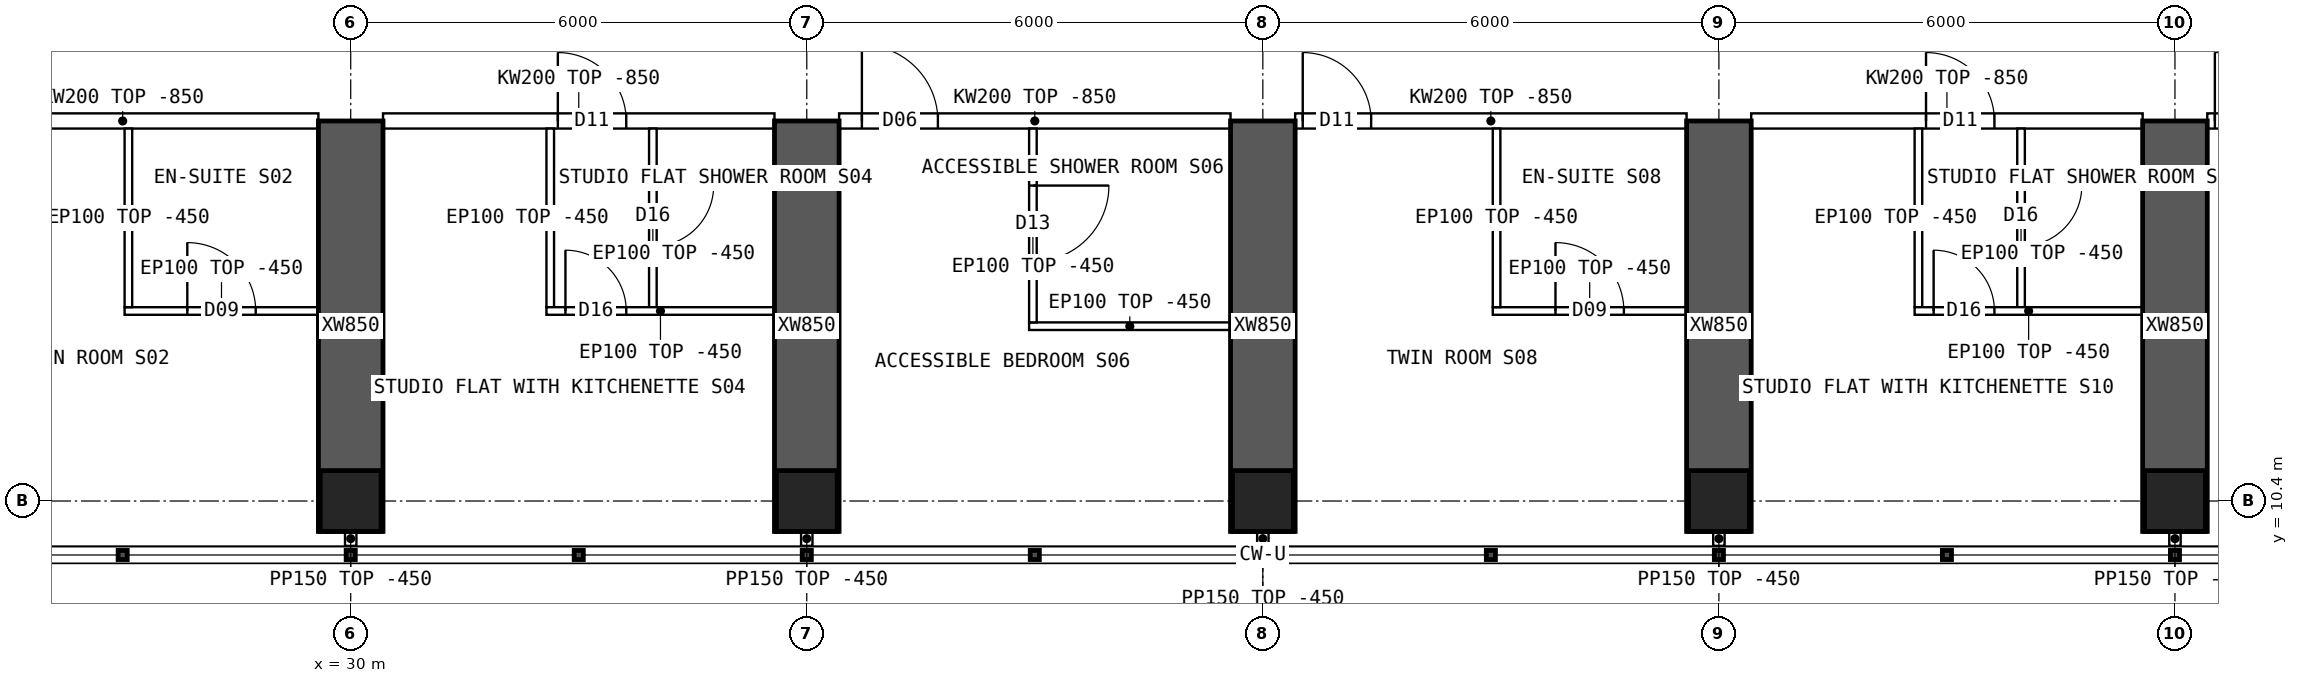
"""IFC4 building model, lengths in metres.
Left out: names, types, materials, properties, quantities, classifications, styles, units other than length and angle.
Written with IfcOpenShell. Run it as: python <this file> out.ifc"""

import sys

from ifc_helpers import new_model, si_unit, direction, frame, frame_2d, origin, origin_2d, place, context, subcontext, project, spatial, polyline, rectangle, hollow_rectangle, outline, extrude, element, fill, save


model = new_model("IFC4")
c1 = context("Model", 3, precision=1e-05, world=origin(), true_north=direction((0.0, 1.0)))
c2 = subcontext(c1, "Body", "Model", "MODEL_VIEW")
j1 = project(units=[si_unit("LENGTHUNIT", "METRE"), si_unit("PLANEANGLEUNIT", "RADIAN")], contexts=[c1])
p1 = place(None, origin())
s1 = spatial("IfcSite", under=j1, at=p1, CompositionType="ELEMENT")
p2 = place(p1, origin())
s2 = spatial("IfcBuilding", under=s1, at=p2, CompositionType="ELEMENT")
p3 = place(p2, frame((0.0, 0.0, 144.85)))
s3 = spatial("IfcBuildingStorey", under=s2, at=p3, CompositionType="ELEMENT", Elevation=144.85)
for number, where, z_axis, x_axis in (
    (1, (30.0, 10.4, 0.0), (0.0, 0.0, 1.0), (1.0, 0.0, 0.0)),
    (2, (36.0, 10.4, 0.0), (0.0, 0.0, 1.0), (1.0, 0.0, 0.0)),
    (3, (42.0, 10.4, 0.0), (0.0, 0.0, 1.0), (1.0, 0.0, 0.0)),
    (4, (48.0, 10.4, 0.0), (0.0, 0.0, 1.0), (1.0, 0.0, 0.0)),
    (5, (54.0, 10.4, 0.0), (0.0, 0.0, 1.0), (1.0, 0.0, 0.0)),
):
    element("IfcColumn", number, at=place(p3, frame(where, z_axis=z_axis, x_axis=x_axis)), inside=s3, PredefinedType="COLUMN", context=c2, shape_type="SweptSolid", body=[
        extrude(hollow_rectangle(XDim=0.8, YDim=0.8, WallThickness=0.08, at=origin_2d()), origin(), (0.0, 0.0, 1.0), 3.75),
    ])
for number, where, z_axis, x_axis in (
    (6, (30.0, 10.0, 0.0), (0.0, 0.0, 1.0), (0.0, 1.0, 0.0)),
    (7, (36.0, 10.0, 0.0), (0.0, 0.0, 1.0), (0.0, 1.0, 0.0)),
    (8, (42.0, 10.0, 0.0), (0.0, 0.0, 1.0), (0.0, 1.0, 0.0)),
    (9, (48.0, 10.0, 0.0), (0.0, 0.0, 1.0), (0.0, 1.0, 0.0)),
    (10, (54.0, 10.0, 0.0), (0.0, 0.0, 1.0), (0.0, 1.0, 0.0)),
):
    element("IfcWall", number, at=place(p3, frame(where, z_axis=z_axis, x_axis=x_axis)), inside=s3, PredefinedType="SHEAR", context=c2, shape_type="SweptSolid", body=[
        extrude(rectangle(XDim=5.4, YDim=0.85, at=frame_2d((2.7, 0.0))), origin(), (0.0, 0.0, 1.0), 3.75),
    ])
p4 = place(p3, frame((24.425, 15.4, 0.0), z_axis=(0.0, 0.0, 1.0), x_axis=(1.0, 0.0, 0.0)))
e11 = element("IfcWall", 11, at=p4, inside=s3, PredefinedType="SOLIDWALL", context=c2, shape_type="SweptSolid", body=[
    extrude(outline(polyline([(0.0, 0.0), (5.15, 0.0), (5.15, 2.9), (0.0, 2.9), (0.0, 0.0)])), frame((0.0, 0.1, 0.0), z_axis=(0.0, -1.0, 0.0), x_axis=(1.0, 0.0, 0.0)), (0.0, 0.0, 1.0), 0.2),
])
p5 = place(p4, frame((0.1, 0.0, 0.0)))
e12 = element("IfcOpeningElement", 12, at=p5, cuts=e11, PredefinedType="OPENING", context=c2, shape_type="SweptSolid", body=[
    extrude(rectangle(XDim=0.9, YDim=2.1, at=frame_2d((0.45, 1.05))), frame((0.0, 0.11, 0.0), z_axis=(0.0, -1.0, 0.0), x_axis=(1.0, 0.0, 0.0)), (0.0, 0.0, 1.0), 0.22),
])
p6 = place(p3, frame((30.425, 15.4, 0.0), z_axis=(0.0, 0.0, 1.0), x_axis=(1.0, 0.0, 0.0)))
e13 = element("IfcWall", 13, at=p6, inside=s3, PredefinedType="SOLIDWALL", context=c2, shape_type="SweptSolid", body=[
    extrude(outline(polyline([(0.0, 0.0), (5.15, 0.0), (5.15, 2.9), (0.0, 2.9), (0.0, 0.0)])), frame((0.0, 0.1, 0.0), z_axis=(0.0, -1.0, 0.0), x_axis=(1.0, 0.0, 0.0)), (0.0, 0.0, 1.0), 0.2),
])
p7 = place(p6, frame((2.3, 0.0, 0.0)))
e14 = element("IfcOpeningElement", 14, at=p7, cuts=e13, PredefinedType="OPENING", context=c2, shape_type="SweptSolid", body=[
    extrude(rectangle(XDim=0.9, YDim=2.1, at=frame_2d((0.45, 1.05))), frame((0.0, 0.11, 0.0), z_axis=(0.0, -1.0, 0.0), x_axis=(1.0, 0.0, 0.0)), (0.0, 0.0, 1.0), 0.22),
])
p8 = place(p3, frame((36.425, 15.4, 0.0), z_axis=(0.0, 0.0, 1.0), x_axis=(1.0, 0.0, 0.0)))
e15 = element("IfcWall", 15, at=p8, inside=s3, PredefinedType="SOLIDWALL", context=c2, shape_type="SweptSolid", body=[
    extrude(outline(polyline([(0.0, 0.0), (5.15, 0.0), (5.15, 2.9), (0.0, 2.9), (0.0, 0.0)])), frame((0.0, 0.1, 0.0), z_axis=(0.0, -1.0, 0.0), x_axis=(1.0, 0.0, 0.0)), (0.0, 0.0, 1.0), 0.2),
])
p9 = place(p8, frame((0.3, 0.0, 0.0)))
e16 = element("IfcOpeningElement", 16, at=p9, cuts=e15, PredefinedType="OPENING", context=c2, shape_type="SweptSolid", body=[
    extrude(rectangle(XDim=1.0, YDim=2.1, at=frame_2d((0.5, 1.05))), frame((0.0, 0.11, 0.0), z_axis=(0.0, -1.0, 0.0), x_axis=(1.0, 0.0, 0.0)), (0.0, 0.0, 1.0), 0.22),
])
p10 = place(p3, frame((42.425, 15.4, 0.0), z_axis=(0.0, 0.0, 1.0), x_axis=(1.0, 0.0, 0.0)))
e17 = element("IfcWall", 17, at=p10, inside=s3, PredefinedType="SOLIDWALL", context=c2, shape_type="SweptSolid", body=[
    extrude(outline(polyline([(0.0, 0.0), (5.15, 0.0), (5.15, 2.9), (0.0, 2.9), (0.0, 0.0)])), frame((0.0, 0.1, 0.0), z_axis=(0.0, -1.0, 0.0), x_axis=(1.0, 0.0, 0.0)), (0.0, 0.0, 1.0), 0.2),
])
p11 = place(p10, frame((0.1, 0.0, 0.0)))
e18 = element("IfcOpeningElement", 18, at=p11, cuts=e17, PredefinedType="OPENING", context=c2, shape_type="SweptSolid", body=[
    extrude(rectangle(XDim=0.9, YDim=2.1, at=frame_2d((0.45, 1.05))), frame((0.0, 0.11, 0.0), z_axis=(0.0, -1.0, 0.0), x_axis=(1.0, 0.0, 0.0)), (0.0, 0.0, 1.0), 0.22),
])
p12 = place(p3, frame((48.425, 15.4, 0.0), z_axis=(0.0, 0.0, 1.0), x_axis=(1.0, 0.0, 0.0)))
e19 = element("IfcWall", 19, at=p12, inside=s3, PredefinedType="SOLIDWALL", context=c2, shape_type="SweptSolid", body=[
    extrude(outline(polyline([(0.0, 0.0), (5.15, 0.0), (5.15, 2.9), (0.0, 2.9), (0.0, 0.0)])), frame((0.0, 0.1, 0.0), z_axis=(0.0, -1.0, 0.0), x_axis=(1.0, 0.0, 0.0)), (0.0, 0.0, 1.0), 0.2),
])
p13 = place(p12, frame((2.3, 0.0, 0.0)))
e20 = element("IfcOpeningElement", 20, at=p13, cuts=e19, PredefinedType="OPENING", context=c2, shape_type="SweptSolid", body=[
    extrude(rectangle(XDim=0.9, YDim=2.1, at=frame_2d((0.45, 1.05))), frame((0.0, 0.11, 0.0), z_axis=(0.0, -1.0, 0.0), x_axis=(1.0, 0.0, 0.0)), (0.0, 0.0, 1.0), 0.22),
])
p14 = place(p3, frame((54.425, 15.4, 0.0), z_axis=(0.0, 0.0, 1.0), x_axis=(1.0, 0.0, 0.0)))
e21 = element("IfcWall", 21, at=p14, inside=s3, PredefinedType="SOLIDWALL", context=c2, shape_type="SweptSolid", body=[
    extrude(outline(polyline([(0.0, 0.0), (5.15, 0.0), (5.15, 2.9), (0.0, 2.9), (0.0, 0.0)])), frame((0.0, 0.1, 0.0), z_axis=(0.0, -1.0, 0.0), x_axis=(1.0, 0.0, 0.0)), (0.0, 0.0, 1.0), 0.2),
])
p15 = place(p14, frame((0.1, 0.0, 0.0)))
e22 = element("IfcOpeningElement", 22, at=p15, cuts=e21, PredefinedType="OPENING", context=c2, shape_type="SweptSolid", body=[
    extrude(rectangle(XDim=0.9, YDim=2.1, at=frame_2d((0.45, 1.05))), frame((0.0, 0.11, 0.0), z_axis=(0.0, -1.0, 0.0), x_axis=(1.0, 0.0, 0.0)), (0.0, 0.0, 1.0), 0.22),
])
p16 = place(p3, frame((29.575, 12.9, 0.0), z_axis=(0.0, 0.0, 1.0), x_axis=(-1.0, 0.0, 0.0)))
e23 = element("IfcWall", 23, at=p16, inside=s3, PredefinedType="PARTITIONING", context=c2, shape_type="SweptSolid", body=[
    extrude(rectangle(XDim=2.55, YDim=0.1, at=frame_2d((1.275, 0.0))), origin(), (0.0, 0.0, 1.0), 3.3),
])
p17 = place(p16, frame((0.825, 0.0, 0.0)))
e24 = element("IfcOpeningElement", 24, at=p17, cuts=e23, PredefinedType="OPENING", context=c2, shape_type="SweptSolid", body=[
    extrude(rectangle(XDim=0.9, YDim=2.1, at=frame_2d((0.45, 1.05))), frame((0.0, 0.06, 0.0), z_axis=(0.0, -1.0, 0.0), x_axis=(1.0, 0.0, 0.0)), (0.0, 0.0, 1.0), 0.12),
])
p18 = place(p3, frame((27.075, 12.95, 0.0), z_axis=(0.0, 0.0, 1.0), x_axis=(0.0, 1.0, 0.0)))
e25 = element("IfcWall", 25, at=p18, inside=s3, PredefinedType="PARTITIONING", context=c2, shape_type="SweptSolid", body=[
    extrude(outline(polyline([(0.0, 0.0), (2.35, 0.0), (2.35, 2.9), (2.302, 2.9), (2.3, 3.3), (0.0, 3.3), (0.0, 0.0)])), frame((0.0, 0.05, 0.0), z_axis=(0.0, -1.0, 0.0), x_axis=(1.0, 0.0, 0.0)), (0.0, 0.0, 1.0), 0.1),
])
p19 = place(p3, frame((35.575, 12.9, 0.0), z_axis=(0.0, 0.0, 1.0), x_axis=(-1.0, 0.0, 0.0)))
e26 = element("IfcWall", 26, at=p19, inside=s3, PredefinedType="PARTITIONING", context=c2, shape_type="SweptSolid", body=[
    extrude(rectangle(XDim=3.0, YDim=0.1, at=frame_2d((1.5, 0.0))), origin(), (0.0, 0.0, 1.0), 3.3),
])
p20 = place(p19, frame((1.95, 0.0, 0.0)))
e27 = element("IfcOpeningElement", 27, at=p20, cuts=e26, PredefinedType="OPENING", context=c2, shape_type="SweptSolid", body=[
    extrude(rectangle(XDim=0.8, YDim=2.1, at=frame_2d((0.4, 1.05))), frame((0.0, 0.06, 0.0), z_axis=(0.0, -1.0, 0.0), x_axis=(1.0, 0.0, 0.0)), (0.0, 0.0, 1.0), 0.12),
])
p21 = place(p3, frame((32.625, 12.95, 0.0), z_axis=(0.0, 0.0, 1.0), x_axis=(0.0, 1.0, 0.0)))
e28 = element("IfcWall", 28, at=p21, inside=s3, PredefinedType="PARTITIONING", context=c2, shape_type="SweptSolid", body=[
    extrude(outline(polyline([(0.0, 0.0), (2.35, 0.0), (2.35, 2.9), (2.302, 2.9), (2.3, 3.3), (0.0, 3.3), (0.0, 0.0)])), frame((0.0, 0.05, 0.0), z_axis=(0.0, -1.0, 0.0), x_axis=(1.0, 0.0, 0.0)), (0.0, 0.0, 1.0), 0.1),
])
p22 = place(p3, frame((33.975, 12.95, 0.0), z_axis=(0.0, 0.0, 1.0), x_axis=(0.0, 1.0, 0.0)))
e29 = element("IfcWall", 29, at=p22, inside=s3, PredefinedType="PARTITIONING", context=c2, shape_type="SweptSolid", body=[
    extrude(outline(polyline([(0.0, 0.0), (2.35, 0.0), (2.35, 2.9), (2.302, 2.9), (2.3, 3.3), (0.0, 3.3), (0.0, 0.0)])), frame((0.0, 0.05, 0.0), z_axis=(0.0, -1.0, 0.0), x_axis=(1.0, 0.0, 0.0)), (0.0, 0.0, 1.0), 0.1),
])
p23 = place(p22, frame((0.8, 0.0, 0.0)))
e30 = element("IfcOpeningElement", 30, at=p23, cuts=e29, PredefinedType="OPENING", context=c2, shape_type="SweptSolid", body=[
    extrude(rectangle(XDim=0.8, YDim=2.1, at=frame_2d((0.4, 1.05))), frame((0.0, 0.06, 0.0), z_axis=(0.0, -1.0, 0.0), x_axis=(1.0, 0.0, 0.0)), (0.0, 0.0, 1.0), 0.12),
])
p24 = place(p3, frame((38.925, 12.7, 0.0), z_axis=(0.0, 0.0, 1.0), x_axis=(1.0, 0.0, 0.0)))
e31 = element("IfcWall", 31, at=p24, inside=s3, PredefinedType="PARTITIONING", context=c2, shape_type="SweptSolid", body=[
    extrude(rectangle(XDim=2.65, YDim=0.1, at=frame_2d((1.325, 0.0))), origin(), (0.0, 0.0, 1.0), 3.3),
])
p25 = place(p3, frame((38.975, 12.75, 0.0), z_axis=(0.0, 0.0, 1.0), x_axis=(0.0, 1.0, 0.0)))
e32 = element("IfcWall", 32, at=p25, inside=s3, PredefinedType="PARTITIONING", context=c2, shape_type="SweptSolid", body=[
    extrude(outline(polyline([(0.0, 0.0), (2.55, 0.0), (2.55, 2.9), (2.502, 2.9), (2.5, 3.3), (0.0, 3.3), (0.0, 0.0)])), frame((0.0, 0.05, 0.0), z_axis=(0.0, -1.0, 0.0), x_axis=(1.0, 0.0, 0.0)), (0.0, 0.0, 1.0), 0.1),
])
p26 = place(p25, frame((0.8, 0.0, 0.0)))
e33 = element("IfcOpeningElement", 33, at=p26, cuts=e32, PredefinedType="OPENING", context=c2, shape_type="SweptSolid", body=[
    extrude(rectangle(XDim=1.0, YDim=2.1, at=frame_2d((0.5, 1.05))), frame((0.0, 0.06, 0.0), z_axis=(0.0, -1.0, 0.0), x_axis=(1.0, 0.0, 0.0)), (0.0, 0.0, 1.0), 0.12),
])
p27 = place(p3, frame((47.575, 12.9, 0.0), z_axis=(0.0, 0.0, 1.0), x_axis=(-1.0, 0.0, 0.0)))
e34 = element("IfcWall", 34, at=p27, inside=s3, PredefinedType="PARTITIONING", context=c2, shape_type="SweptSolid", body=[
    extrude(rectangle(XDim=2.55, YDim=0.1, at=frame_2d((1.275, 0.0))), origin(), (0.0, 0.0, 1.0), 3.3),
])
p28 = place(p27, frame((0.825, 0.0, 0.0)))
e35 = element("IfcOpeningElement", 35, at=p28, cuts=e34, PredefinedType="OPENING", context=c2, shape_type="SweptSolid", body=[
    extrude(rectangle(XDim=0.9, YDim=2.1, at=frame_2d((0.45, 1.05))), frame((0.0, 0.06, 0.0), z_axis=(0.0, -1.0, 0.0), x_axis=(1.0, 0.0, 0.0)), (0.0, 0.0, 1.0), 0.12),
])
p29 = place(p3, frame((45.075, 12.95, 0.0), z_axis=(0.0, 0.0, 1.0), x_axis=(0.0, 1.0, 0.0)))
e36 = element("IfcWall", 36, at=p29, inside=s3, PredefinedType="PARTITIONING", context=c2, shape_type="SweptSolid", body=[
    extrude(outline(polyline([(0.0, 0.0), (2.35, 0.0), (2.35, 2.9), (2.302, 2.9), (2.3, 3.3), (0.0, 3.3), (0.0, 0.0)])), frame((0.0, 0.05, 0.0), z_axis=(0.0, -1.0, 0.0), x_axis=(1.0, 0.0, 0.0)), (0.0, 0.0, 1.0), 0.1),
])
p30 = place(p3, frame((53.575, 12.9, 0.0), z_axis=(0.0, 0.0, 1.0), x_axis=(-1.0, 0.0, 0.0)))
e37 = element("IfcWall", 37, at=p30, inside=s3, PredefinedType="PARTITIONING", context=c2, shape_type="SweptSolid", body=[
    extrude(rectangle(XDim=3.0, YDim=0.1, at=frame_2d((1.5, 0.0))), origin(), (0.0, 0.0, 1.0), 3.3),
])
p31 = place(p30, frame((1.95, 0.0, 0.0)))
e38 = element("IfcOpeningElement", 38, at=p31, cuts=e37, PredefinedType="OPENING", context=c2, shape_type="SweptSolid", body=[
    extrude(rectangle(XDim=0.8, YDim=2.1, at=frame_2d((0.4, 1.05))), frame((0.0, 0.06, 0.0), z_axis=(0.0, -1.0, 0.0), x_axis=(1.0, 0.0, 0.0)), (0.0, 0.0, 1.0), 0.12),
])
p32 = place(p3, frame((50.625, 12.95, 0.0), z_axis=(0.0, 0.0, 1.0), x_axis=(0.0, 1.0, 0.0)))
e39 = element("IfcWall", 39, at=p32, inside=s3, PredefinedType="PARTITIONING", context=c2, shape_type="SweptSolid", body=[
    extrude(outline(polyline([(0.0, 0.0), (2.35, 0.0), (2.35, 2.9), (2.302, 2.9), (2.3, 3.3), (0.0, 3.3), (0.0, 0.0)])), frame((0.0, 0.05, 0.0), z_axis=(0.0, -1.0, 0.0), x_axis=(1.0, 0.0, 0.0)), (0.0, 0.0, 1.0), 0.1),
])
p33 = place(p3, frame((51.975, 12.95, 0.0), z_axis=(0.0, 0.0, 1.0), x_axis=(0.0, 1.0, 0.0)))
e40 = element("IfcWall", 40, at=p33, inside=s3, PredefinedType="PARTITIONING", context=c2, shape_type="SweptSolid", body=[
    extrude(outline(polyline([(0.0, 0.0), (2.35, 0.0), (2.35, 2.9), (2.302, 2.9), (2.3, 3.3), (0.0, 3.3), (0.0, 0.0)])), frame((0.0, 0.05, 0.0), z_axis=(0.0, -1.0, 0.0), x_axis=(1.0, 0.0, 0.0)), (0.0, 0.0, 1.0), 0.1),
])
p34 = place(p33, frame((0.8, 0.0, 0.0)))
e41 = element("IfcOpeningElement", 41, at=p34, cuts=e40, PredefinedType="OPENING", context=c2, shape_type="SweptSolid", body=[
    extrude(rectangle(XDim=0.8, YDim=2.1, at=frame_2d((0.4, 1.05))), frame((0.0, 0.06, 0.0), z_axis=(0.0, -1.0, 0.0), x_axis=(1.0, 0.0, 0.0)), (0.0, 0.0, 1.0), 0.12),
])
for number, where, z_axis, x_axis in (
    (42, (30.0, 10.0, 0.0), (0.0, 0.0, 1.0), (0.0, -1.0, 0.0)),
    (43, (36.0, 10.0, 0.0), (0.0, 0.0, 1.0), (0.0, -1.0, 0.0)),
    (44, (42.0, 10.0, 0.0), (0.0, 0.0, 1.0), (0.0, -1.0, 0.0)),
    (45, (48.0, 10.0, 0.0), (0.0, 0.0, 1.0), (0.0, -1.0, 0.0)),
    (46, (54.0, 10.0, 0.0), (0.0, 0.0, 1.0), (0.0, -1.0, 0.0)),
):
    element("IfcWall", number, at=place(p3, frame(where, z_axis=z_axis, x_axis=x_axis)), inside=s3, PredefinedType="PARTITIONING", context=c2, shape_type="SweptSolid", body=[
        extrude(rectangle(XDim=0.19, YDim=0.15, at=frame_2d((0.095, 0.0))), origin(), (0.0, 0.0, 1.0), 3.3),
    ])
p35 = place(p17, origin())
e47 = element("IfcDoor", 47, at=p35, inside=s3, OperationType="SINGLE_SWING_RIGHT", PredefinedType="DOOR", context=c2, shape_type="SweptSolid", body=[
    extrude(rectangle(XDim=0.9, YDim=2.1, at=frame_2d((0.45, 1.05))), frame((0.0, 0.025, 0.0), z_axis=(0.0, -1.0, 0.0), x_axis=(1.0, 0.0, 0.0)), (0.0, 0.0, 1.0), 0.05),
])
fill(e24, e47)
p36 = place(p20, origin())
e48 = element("IfcDoor", 48, at=p36, inside=s3, OperationType="SINGLE_SWING_RIGHT", PredefinedType="DOOR", context=c2, shape_type="SweptSolid", body=[
    extrude(rectangle(XDim=0.8, YDim=2.1, at=frame_2d((0.4, 1.05))), frame((0.0, 0.025, 0.0), z_axis=(0.0, -1.0, 0.0), x_axis=(1.0, 0.0, 0.0)), (0.0, 0.0, 1.0), 0.05),
])
fill(e27, e48)
p37 = place(p23, origin())
e49 = element("IfcDoor", 49, at=p37, inside=s3, OperationType="SINGLE_SWING_RIGHT", PredefinedType="DOOR", context=c2, shape_type="SweptSolid", body=[
    extrude(rectangle(XDim=0.8, YDim=2.1, at=frame_2d((0.4, 1.05))), frame((0.0, 0.025, 0.0), z_axis=(0.0, -1.0, 0.0), x_axis=(1.0, 0.0, 0.0)), (0.0, 0.0, 1.0), 0.05),
])
fill(e30, e49)
p38 = place(p7, origin())
e50 = element("IfcDoor", 50, at=p38, inside=s3, OperationType="SINGLE_SWING_LEFT", PredefinedType="DOOR", context=c2, shape_type="SweptSolid", body=[
    extrude(rectangle(XDim=0.9, YDim=2.1, at=frame_2d((0.45, 1.05))), frame((0.0, 0.025, 0.0), z_axis=(0.0, -1.0, 0.0), x_axis=(1.0, 0.0, 0.0)), (0.0, 0.0, 1.0), 0.05),
])
fill(e14, e50)
p39 = place(p26, origin())
e51 = element("IfcDoor", 51, at=p39, inside=s3, OperationType="SINGLE_SWING_RIGHT", PredefinedType="DOOR", context=c2, shape_type="SweptSolid", body=[
    extrude(rectangle(XDim=1.0, YDim=2.1, at=frame_2d((0.5, 1.05))), frame((0.0, 0.025, 0.0), z_axis=(0.0, -1.0, 0.0), x_axis=(1.0, 0.0, 0.0)), (0.0, 0.0, 1.0), 0.05),
])
fill(e33, e51)
p40 = place(p9, origin())
e52 = element("IfcDoor", 52, at=p40, inside=s3, OperationType="SINGLE_SWING_LEFT", PredefinedType="DOOR", context=c2, shape_type="SweptSolid", body=[
    extrude(rectangle(XDim=1.0, YDim=2.1, at=frame_2d((0.5, 1.05))), frame((0.0, 0.025, 0.0), z_axis=(0.0, -1.0, 0.0), x_axis=(1.0, 0.0, 0.0)), (0.0, 0.0, 1.0), 0.05),
])
fill(e16, e52)
p41 = place(p28, origin())
e53 = element("IfcDoor", 53, at=p41, inside=s3, OperationType="SINGLE_SWING_RIGHT", PredefinedType="DOOR", context=c2, shape_type="SweptSolid", body=[
    extrude(rectangle(XDim=0.9, YDim=2.1, at=frame_2d((0.45, 1.05))), frame((0.0, 0.025, 0.0), z_axis=(0.0, -1.0, 0.0), x_axis=(1.0, 0.0, 0.0)), (0.0, 0.0, 1.0), 0.05),
])
fill(e35, e53)
p42 = place(p11, origin())
e54 = element("IfcDoor", 54, at=p42, inside=s3, OperationType="SINGLE_SWING_LEFT", PredefinedType="DOOR", context=c2, shape_type="SweptSolid", body=[
    extrude(rectangle(XDim=0.9, YDim=2.1, at=frame_2d((0.45, 1.05))), frame((0.0, 0.025, 0.0), z_axis=(0.0, -1.0, 0.0), x_axis=(1.0, 0.0, 0.0)), (0.0, 0.0, 1.0), 0.05),
])
fill(e18, e54)
p43 = place(p31, origin())
e55 = element("IfcDoor", 55, at=p43, inside=s3, OperationType="SINGLE_SWING_RIGHT", PredefinedType="DOOR", context=c2, shape_type="SweptSolid", body=[
    extrude(rectangle(XDim=0.8, YDim=2.1, at=frame_2d((0.4, 1.05))), frame((0.0, 0.025, 0.0), z_axis=(0.0, -1.0, 0.0), x_axis=(1.0, 0.0, 0.0)), (0.0, 0.0, 1.0), 0.05),
])
fill(e38, e55)
p44 = place(p34, origin())
e56 = element("IfcDoor", 56, at=p44, inside=s3, OperationType="SINGLE_SWING_RIGHT", PredefinedType="DOOR", context=c2, shape_type="SweptSolid", body=[
    extrude(rectangle(XDim=0.8, YDim=2.1, at=frame_2d((0.4, 1.05))), frame((0.0, 0.025, 0.0), z_axis=(0.0, -1.0, 0.0), x_axis=(1.0, 0.0, 0.0)), (0.0, 0.0, 1.0), 0.05),
])
fill(e41, e56)
p45 = place(p13, origin())
e57 = element("IfcDoor", 57, at=p45, inside=s3, OperationType="SINGLE_SWING_LEFT", PredefinedType="DOOR", context=c2, shape_type="SweptSolid", body=[
    extrude(rectangle(XDim=0.9, YDim=2.1, at=frame_2d((0.45, 1.05))), frame((0.0, 0.025, 0.0), z_axis=(0.0, -1.0, 0.0), x_axis=(1.0, 0.0, 0.0)), (0.0, 0.0, 1.0), 0.05),
])
fill(e20, e57)
p46 = place(p15, origin())
e58 = element("IfcDoor", 58, at=p46, inside=s3, OperationType="SINGLE_SWING_LEFT", PredefinedType="DOOR", context=c2, shape_type="SweptSolid", body=[
    extrude(rectangle(XDim=0.9, YDim=2.1, at=frame_2d((0.45, 1.05))), frame((0.0, 0.025, 0.0), z_axis=(0.0, -1.0, 0.0), x_axis=(1.0, 0.0, 0.0)), (0.0, 0.0, 1.0), 0.05),
])
fill(e22, e58)
save(model, sys.argv[1])
